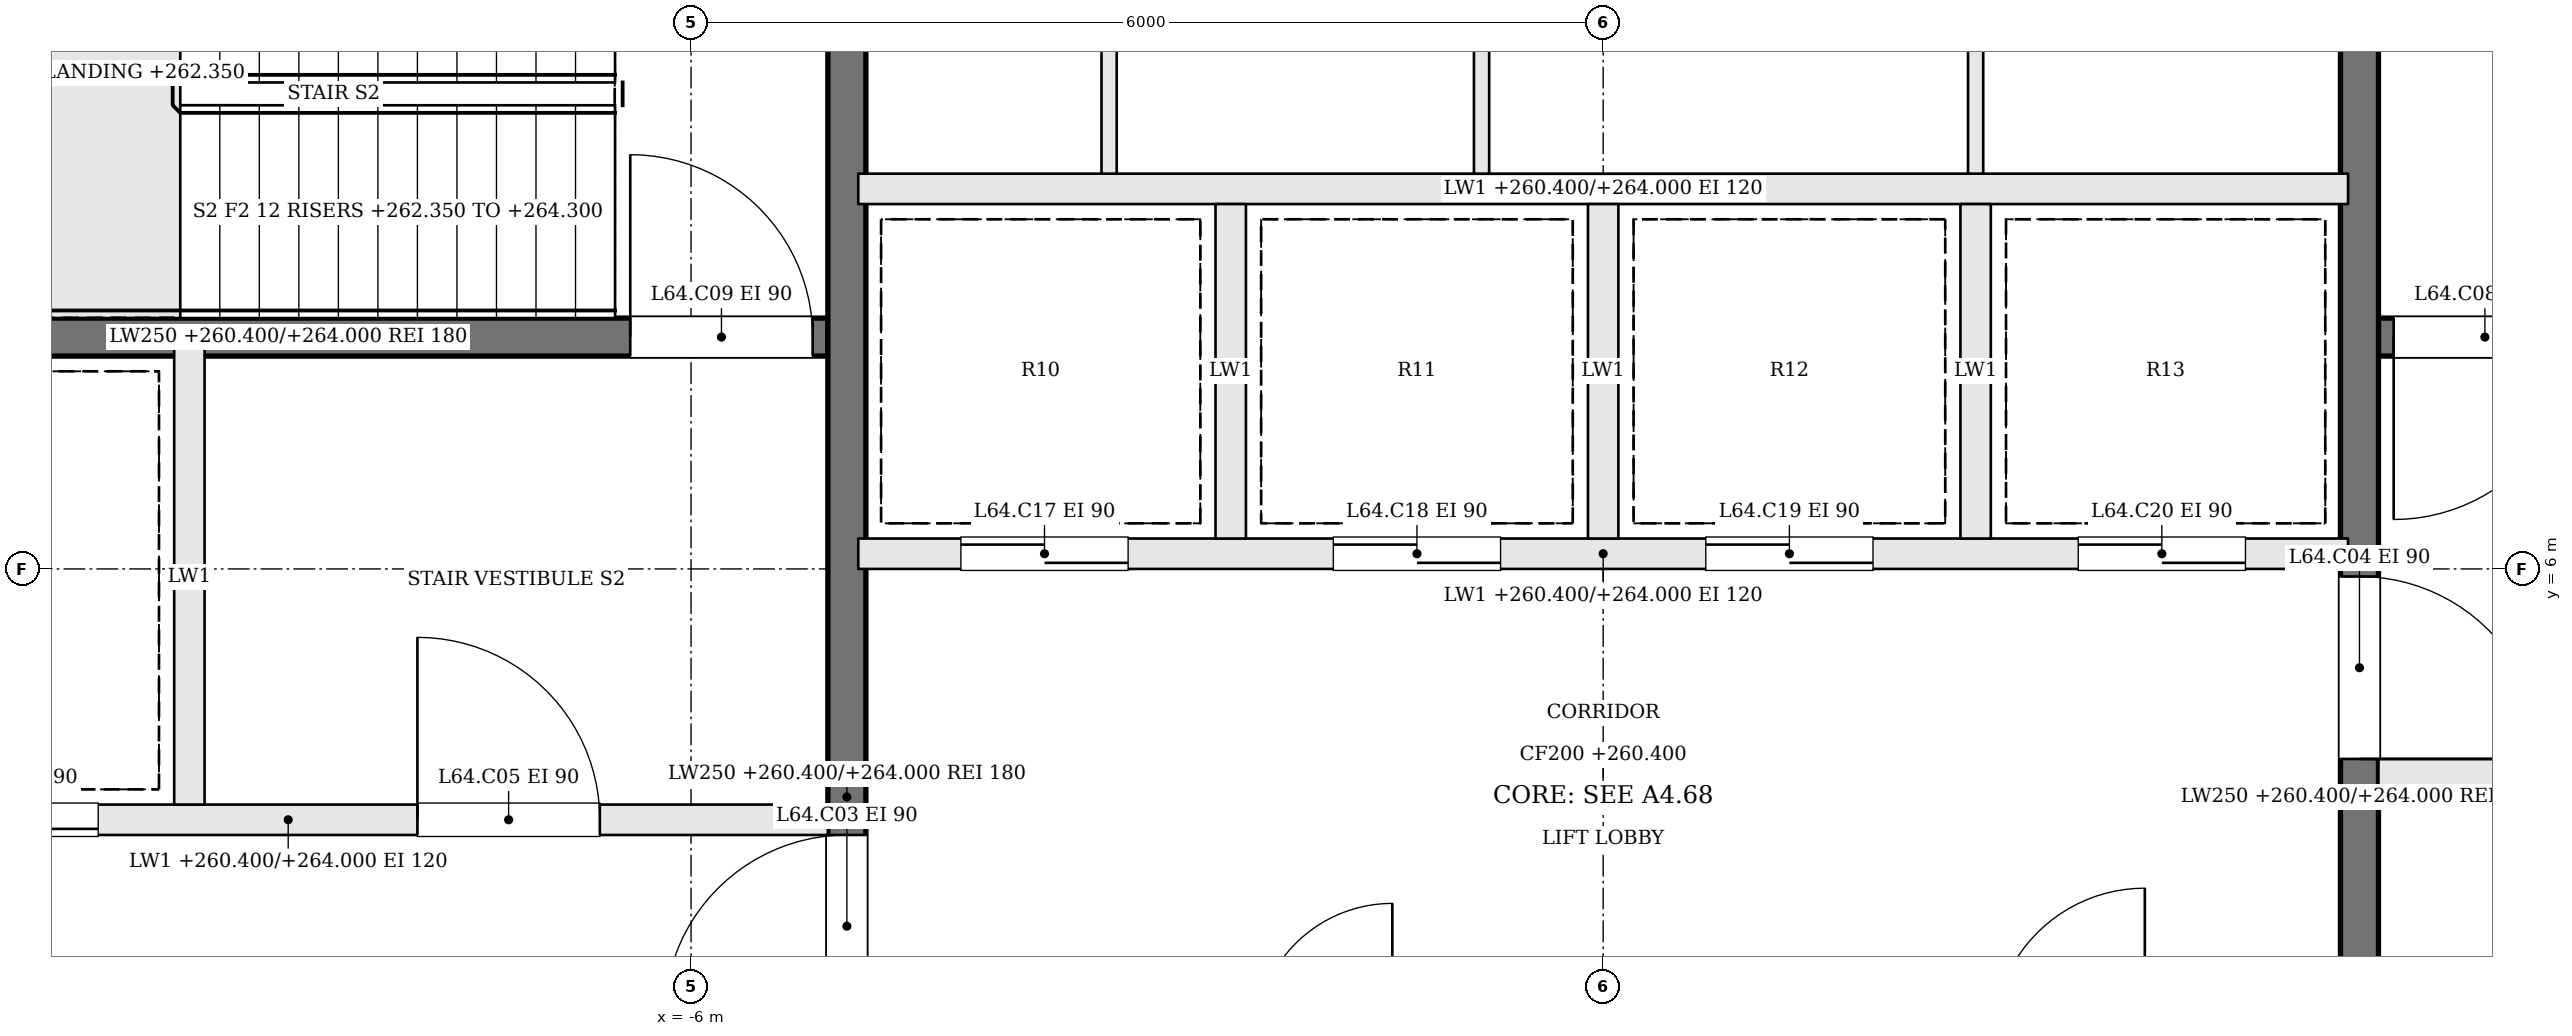
"""IFC4 building model, lengths in metres.
Left out: names, types, materials, properties, quantities, classifications, styles, units other than length and angle.
Written with IfcOpenShell. Run it as: python <this file> out.ifc"""

import sys

from ifc_helpers import new_model, si_unit, direction, frame, frame_2d, origin, place, context, subcontext, project, spatial, rectangle, extrude, element, fill, save


model = new_model("IFC4")
c1 = context("Model", 3, precision=1e-05, world=origin(), true_north=direction((0.0, 1.0)))
c2 = subcontext(c1, "Body", "Model", "MODEL_VIEW")
j1 = project(units=[si_unit("LENGTHUNIT", "METRE"), si_unit("PLANEANGLEUNIT", "RADIAN")], contexts=[c1])
p1 = place(None, origin())
s1 = spatial("IfcSite", under=j1, at=p1, CompositionType="ELEMENT")
p2 = place(p1, origin())
s2 = spatial("IfcBuilding", under=s1, at=p2, CompositionType="ELEMENT")
p3 = place(p2, frame((0.0, 0.0, 260.4)))
s3 = spatial("IfcBuildingStorey", under=s2, at=p3, CompositionType="ELEMENT", Elevation=260.4)
p4 = place(p3, frame((12.2, 7.525, 0.0), z_axis=(0.0, 0.0, 1.0), x_axis=(-1.0, 0.0, 0.0)))
e1 = element("IfcWall", 1, at=p4, inside=s3, PredefinedType="SOLIDWALL", context=c2, shape_type="SweptSolid", body=[
    extrude(rectangle(XDim=7.1, YDim=0.25, at=frame_2d((3.55, 0.0))), origin(), (0.0, 0.0, 1.0), 3.6),
])
p5 = place(p4, frame((5.8, 0.0, 0.0)))
e2 = element("IfcOpeningElement", 2, at=p5, cuts=e1, PredefinedType="OPENING", context=c2, shape_type="SweptSolid", body=[
    extrude(rectangle(XDim=1.2, YDim=2.1, at=frame_2d((0.6, 1.05))), frame((0.0, 0.135, 0.0), z_axis=(0.0, -1.0, 0.0), x_axis=(1.0, 0.0, 0.0)), (0.0, 0.0, 1.0), 0.27),
])
p6 = place(p3, frame((-12.2, 4.35, 0.0), z_axis=(0.0, 0.0, 1.0), x_axis=(1.0, 0.0, 0.0)))
e3 = element("IfcWall", 3, at=p6, inside=s3, PredefinedType="SOLIDWALL", context=c2, shape_type="SweptSolid", body=[
    extrude(rectangle(XDim=7.1, YDim=0.2, at=frame_2d((3.55, 0.0))), origin(), (0.0, 0.0, 1.0), 3.6),
])
p7 = place(p6, frame((4.4, 0.0, 0.0)))
e4 = element("IfcOpeningElement", 4, at=p7, cuts=e3, PredefinedType="OPENING", context=c2, shape_type="SweptSolid", body=[
    extrude(rectangle(XDim=1.2, YDim=2.1, at=frame_2d((0.6, 1.05))), frame((0.0, 0.11, 0.0), z_axis=(0.0, -1.0, 0.0), x_axis=(1.0, 0.0, 0.0)), (0.0, 0.0, 1.0), 0.22),
])
p8 = place(p6, frame((1.1, 0.0, 0.0)))
e5 = element("IfcOpeningElement", 5, at=p8, cuts=e3, PredefinedType="OPENING", context=c2, shape_type="SweptSolid", body=[
    extrude(rectangle(XDim=1.2, YDim=2.1, at=frame_2d((0.6, 1.05))), frame((0.0, 0.11, 0.0), z_axis=(0.0, -1.0, 0.0), x_axis=(1.0, 0.0, 0.0)), (0.0, 0.0, 1.0), 0.22),
])
p9 = place(p3, frame((12.2, 4.65, 0.0), z_axis=(0.0, 0.0, 1.0), x_axis=(-1.0, 0.0, 0.0)))
e6 = element("IfcWall", 6, at=p9, inside=s3, PredefinedType="SOLIDWALL", context=c2, shape_type="SweptSolid", body=[
    extrude(rectangle(XDim=7.1, YDim=0.2, at=frame_2d((3.55, 0.0))), origin(), (0.0, 0.0, 1.0), 3.6),
])
p10 = place(p9, frame((4.4, 0.0, 0.0)))
e7 = element("IfcOpeningElement", 7, at=p10, cuts=e6, PredefinedType="OPENING", context=c2, shape_type="SweptSolid", body=[
    extrude(rectangle(XDim=1.2, YDim=2.1, at=frame_2d((0.6, 1.05))), frame((0.0, 0.11, 0.0), z_axis=(0.0, -1.0, 0.0), x_axis=(1.0, 0.0, 0.0)), (0.0, 0.0, 1.0), 0.22),
])
p11 = place(p9, frame((1.1, 0.0, 0.0)))
e8 = element("IfcOpeningElement", 8, at=p11, cuts=e6, PredefinedType="OPENING", context=c2, shape_type="SweptSolid", body=[
    extrude(rectangle(XDim=1.2, YDim=2.1, at=frame_2d((0.6, 1.05))), frame((0.0, 0.11, 0.0), z_axis=(0.0, -1.0, 0.0), x_axis=(1.0, 0.0, 0.0)), (0.0, 0.0, 1.0), 0.22),
])
p12 = place(p3, frame((-12.2, 7.525, 0.0), z_axis=(0.0, 0.0, 1.0), x_axis=(1.0, 0.0, 0.0)))
e9 = element("IfcWall", 9, at=p12, inside=s3, PredefinedType="SOLIDWALL", context=c2, shape_type="SweptSolid", body=[
    extrude(rectangle(XDim=7.1, YDim=0.25, at=frame_2d((3.55, 0.0))), origin(), (0.0, 0.0, 1.0), 3.6),
])
p13 = place(p12, frame((5.8, 0.0, 0.0)))
e10 = element("IfcOpeningElement", 10, at=p13, cuts=e9, PredefinedType="OPENING", context=c2, shape_type="SweptSolid", body=[
    extrude(rectangle(XDim=1.2, YDim=2.1, at=frame_2d((0.6, 1.05))), frame((0.0, 0.135, 0.0), z_axis=(0.0, -1.0, 0.0), x_axis=(1.0, 0.0, 0.0)), (0.0, 0.0, 1.0), 0.27),
])
p14 = place(p3, frame((-9.3, 4.45, 0.0), z_axis=(0.0, 0.0, 1.0), x_axis=(0.0, 1.0, 0.0)))
e11 = element("IfcWall", 11, at=p14, inside=s3, PredefinedType="SOLIDWALL", context=c2, shape_type="SweptSolid", body=[
    extrude(rectangle(XDim=3.0, YDim=0.2, at=frame_2d((1.5, 0.0))), origin(), (0.0, 0.0, 1.0), 3.6),
])
p15 = place(p3, frame((-4.975, -2.2, 0.0), z_axis=(0.0, 0.0, 1.0), x_axis=(0.0, 1.0, 0.0)))
e12 = element("IfcWall", 12, at=p15, inside=s3, PredefinedType="SOLIDWALL", context=c2, shape_type="SweptSolid", body=[
    extrude(rectangle(XDim=13.4, YDim=0.25, at=frame_2d((6.7, 0.0))), origin(), (0.0, 0.0, 1.0), 3.6),
])
p16 = place(p15, frame((5.25, 0.0, 0.0)))
e13 = element("IfcOpeningElement", 13, at=p16, cuts=e12, PredefinedType="OPENING", context=c2, shape_type="SweptSolid", body=[
    extrude(rectangle(XDim=1.2, YDim=2.1, at=frame_2d((0.6, 1.05))), frame((0.0, 0.135, 0.0), z_axis=(0.0, -1.0, 0.0), x_axis=(1.0, 0.0, 0.0)), (0.0, 0.0, 1.0), 0.27),
])
p17 = place(p3, frame((4.975, 11.2, 0.0), z_axis=(0.0, 0.0, 1.0), x_axis=(0.0, -1.0, 0.0)))
e14 = element("IfcWall", 14, at=p17, inside=s3, PredefinedType="SOLIDWALL", context=c2, shape_type="SweptSolid", body=[
    extrude(rectangle(XDim=13.4, YDim=0.25, at=frame_2d((6.7, 0.0))), origin(), (0.0, 0.0, 1.0), 3.6),
])
p18 = place(p17, frame((5.25, 0.0, 0.0)))
e15 = element("IfcOpeningElement", 15, at=p18, cuts=e14, PredefinedType="OPENING", context=c2, shape_type="SweptSolid", body=[
    extrude(rectangle(XDim=1.2, YDim=2.1, at=frame_2d((0.6, 1.05))), frame((0.0, 0.135, 0.0), z_axis=(0.0, -1.0, 0.0), x_axis=(1.0, 0.0, 0.0)), (0.0, 0.0, 1.0), 0.27),
])
p19 = place(p3, frame((-4.9, 6.1, 0.0), z_axis=(0.0, 0.0, 1.0), x_axis=(1.0, 0.0, 0.0)))
e16 = element("IfcWall", 16, at=p19, inside=s3, PredefinedType="SOLIDWALL", context=c2, shape_type="SweptSolid", body=[
    extrude(rectangle(XDim=9.8, YDim=0.2, at=frame_2d((4.9, 0.0))), origin(), (0.0, 0.0, 1.0), 3.6),
])
p20 = place(p19, frame((0.675, 0.0, 0.0)))
e17 = element("IfcOpeningElement", 17, at=p20, cuts=e16, PredefinedType="OPENING", context=c2, shape_type="SweptSolid", body=[
    extrude(rectangle(XDim=1.1, YDim=2.1, at=frame_2d((0.55, 1.05))), frame((0.0, 0.11, 0.0), z_axis=(0.0, -1.0, 0.0), x_axis=(1.0, 0.0, 0.0)), (0.0, 0.0, 1.0), 0.22),
])
p21 = place(p19, frame((3.125, 0.0, 0.0)))
e18 = element("IfcOpeningElement", 18, at=p21, cuts=e16, PredefinedType="OPENING", context=c2, shape_type="SweptSolid", body=[
    extrude(rectangle(XDim=1.1, YDim=2.1, at=frame_2d((0.55, 1.05))), frame((0.0, 0.11, 0.0), z_axis=(0.0, -1.0, 0.0), x_axis=(1.0, 0.0, 0.0)), (0.0, 0.0, 1.0), 0.22),
])
p22 = place(p19, frame((5.575, 0.0, 0.0)))
e19 = element("IfcOpeningElement", 19, at=p22, cuts=e16, PredefinedType="OPENING", context=c2, shape_type="SweptSolid", body=[
    extrude(rectangle(XDim=1.1, YDim=2.1, at=frame_2d((0.55, 1.05))), frame((0.0, 0.11, 0.0), z_axis=(0.0, -1.0, 0.0), x_axis=(1.0, 0.0, 0.0)), (0.0, 0.0, 1.0), 0.22),
])
p23 = place(p19, frame((8.025, 0.0, 0.0)))
e20 = element("IfcOpeningElement", 20, at=p23, cuts=e16, PredefinedType="OPENING", context=c2, shape_type="SweptSolid", body=[
    extrude(rectangle(XDim=1.1, YDim=2.1, at=frame_2d((0.55, 1.05))), frame((0.0, 0.11, 0.0), z_axis=(0.0, -1.0, 0.0), x_axis=(1.0, 0.0, 0.0)), (0.0, 0.0, 1.0), 0.22),
])
p24 = place(p3, frame((-4.9, 8.5, 0.0), z_axis=(0.0, 0.0, 1.0), x_axis=(1.0, 0.0, 0.0)))
e21 = element("IfcWall", 21, at=p24, inside=s3, PredefinedType="SOLIDWALL", context=c2, shape_type="SweptSolid", body=[
    extrude(rectangle(XDim=9.8, YDim=0.2, at=frame_2d((4.9, 0.0))), origin(), (0.0, 0.0, 1.0), 3.6),
])
for number, where, z_axis, x_axis in (
    (22, (-2.45, 6.2, 0.0), (0.0, 0.0, 1.0), (0.0, 1.0, 0.0)),
    (23, (0.0, 6.2, 0.0), (0.0, 0.0, 1.0), (0.0, 1.0, 0.0)),
    (24, (2.45, 6.2, 0.0), (0.0, 0.0, 1.0), (0.0, 1.0, 0.0)),
):
    element("IfcWall", number, at=place(p3, frame(where, z_axis=z_axis, x_axis=x_axis)), inside=s3, PredefinedType="SOLIDWALL", context=c2, shape_type="SweptSolid", body=[
        extrude(rectangle(XDim=2.2, YDim=0.2, at=frame_2d((1.1, 0.0))), origin(), (0.0, 0.0, 1.0), 3.6),
    ])
for number, where, z_axis, x_axis in (
    (25, (-3.25, 8.6, 0.0), (0.0, 0.0, 1.0), (0.0, 1.0, 0.0)),
    (26, (-0.8, 8.6, 0.0), (0.0, 0.0, 1.0), (0.0, 1.0, 0.0)),
    (27, (2.45, 8.6, 0.0), (0.0, 0.0, 1.0), (0.0, 1.0, 0.0)),
):
    element("IfcWall", number, at=place(p3, frame(where, z_axis=z_axis, x_axis=x_axis)), inside=s3, PredefinedType="PARTITIONING", context=c2, shape_type="SweptSolid", body=[
        extrude(rectangle(XDim=2.6, YDim=0.1, at=frame_2d((1.3, 0.0))), origin(), (0.0, 0.0, 1.0), 3.6),
    ])
p25 = place(p16, origin())
e28 = element("IfcDoor", 28, at=p25, inside=s3, OperationType="SINGLE_SWING_LEFT", PredefinedType="DOOR", context=c2, shape_type="SweptSolid", body=[
    extrude(rectangle(XDim=1.2, YDim=2.1, at=frame_2d((0.6, 1.05))), frame((0.0, 0.025, 0.0), z_axis=(0.0, -1.0, 0.0), x_axis=(1.0, 0.0, 0.0)), (0.0, 0.0, 1.0), 0.05),
])
fill(e13, e28)
p26 = place(p18, origin())
e29 = element("IfcDoor", 29, at=p26, inside=s3, OperationType="SINGLE_SWING_RIGHT", PredefinedType="DOOR", context=c2, shape_type="SweptSolid", body=[
    extrude(rectangle(XDim=1.2, YDim=2.1, at=frame_2d((0.6, 1.05))), frame((0.0, 0.025, 0.0), z_axis=(0.0, -1.0, 0.0), x_axis=(1.0, 0.0, 0.0)), (0.0, 0.0, 1.0), 0.05),
])
fill(e15, e29)
p27 = place(p7, origin())
e30 = element("IfcDoor", 30, at=p27, inside=s3, OperationType="SINGLE_SWING_LEFT", PredefinedType="DOOR", context=c2, shape_type="SweptSolid", body=[
    extrude(rectangle(XDim=1.2, YDim=2.1, at=frame_2d((0.6, 1.05))), frame((0.0, 0.025, 0.0), z_axis=(0.0, -1.0, 0.0), x_axis=(1.0, 0.0, 0.0)), (0.0, 0.0, 1.0), 0.05),
])
fill(e4, e30)
p28 = place(p5, origin())
e31 = element("IfcDoor", 31, at=p28, inside=s3, OperationType="SINGLE_SWING_RIGHT", PredefinedType="DOOR", context=c2, shape_type="SweptSolid", body=[
    extrude(rectangle(XDim=1.2, YDim=2.1, at=frame_2d((0.6, 1.05))), frame((0.0, 0.025, 0.0), z_axis=(0.0, -1.0, 0.0), x_axis=(1.0, 0.0, 0.0)), (0.0, 0.0, 1.0), 0.05),
])
fill(e2, e31)
p29 = place(p13, origin())
e32 = element("IfcDoor", 32, at=p29, inside=s3, OperationType="SINGLE_SWING_LEFT", PredefinedType="DOOR", context=c2, shape_type="SweptSolid", body=[
    extrude(rectangle(XDim=1.2, YDim=2.1, at=frame_2d((0.6, 1.05))), frame((0.0, 0.025, 0.0), z_axis=(0.0, -1.0, 0.0), x_axis=(1.0, 0.0, 0.0)), (0.0, 0.0, 1.0), 0.05),
])
fill(e10, e32)
p30 = place(p8, origin())
e33 = element("IfcDoor", 33, at=p30, inside=s3, OperationType="SLIDING_TO_RIGHT", PredefinedType="DOOR", context=c2, shape_type="SweptSolid", body=[
    extrude(rectangle(XDim=1.2, YDim=2.1, at=frame_2d((0.6, 1.05))), frame((0.0, 0.025, 0.0), z_axis=(0.0, -1.0, 0.0), x_axis=(1.0, 0.0, 0.0)), (0.0, 0.0, 1.0), 0.05),
])
fill(e5, e33)
p31 = place(p20, origin())
e34 = element("IfcDoor", 34, at=p31, inside=s3, OperationType="SLIDING_TO_RIGHT", PredefinedType="DOOR", context=c2, shape_type="SweptSolid", body=[
    extrude(rectangle(XDim=1.1, YDim=2.1, at=frame_2d((0.55, 1.05))), frame((0.0, 0.025, 0.0), z_axis=(0.0, -1.0, 0.0), x_axis=(1.0, 0.0, 0.0)), (0.0, 0.0, 1.0), 0.05),
])
fill(e17, e34)
p32 = place(p21, origin())
e35 = element("IfcDoor", 35, at=p32, inside=s3, OperationType="SLIDING_TO_LEFT", PredefinedType="DOOR", context=c2, shape_type="SweptSolid", body=[
    extrude(rectangle(XDim=1.1, YDim=2.1, at=frame_2d((0.55, 1.05))), frame((0.0, 0.025, 0.0), z_axis=(0.0, -1.0, 0.0), x_axis=(1.0, 0.0, 0.0)), (0.0, 0.0, 1.0), 0.05),
])
fill(e18, e35)
p33 = place(p22, origin())
e36 = element("IfcDoor", 36, at=p33, inside=s3, OperationType="SLIDING_TO_RIGHT", PredefinedType="DOOR", context=c2, shape_type="SweptSolid", body=[
    extrude(rectangle(XDim=1.1, YDim=2.1, at=frame_2d((0.55, 1.05))), frame((0.0, 0.025, 0.0), z_axis=(0.0, -1.0, 0.0), x_axis=(1.0, 0.0, 0.0)), (0.0, 0.0, 1.0), 0.05),
])
fill(e19, e36)
p34 = place(p23, origin())
e37 = element("IfcDoor", 37, at=p34, inside=s3, OperationType="SLIDING_TO_LEFT", PredefinedType="DOOR", context=c2, shape_type="SweptSolid", body=[
    extrude(rectangle(XDim=1.1, YDim=2.1, at=frame_2d((0.55, 1.05))), frame((0.0, 0.025, 0.0), z_axis=(0.0, -1.0, 0.0), x_axis=(1.0, 0.0, 0.0)), (0.0, 0.0, 1.0), 0.05),
])
fill(e20, e37)
save(model, sys.argv[1])
